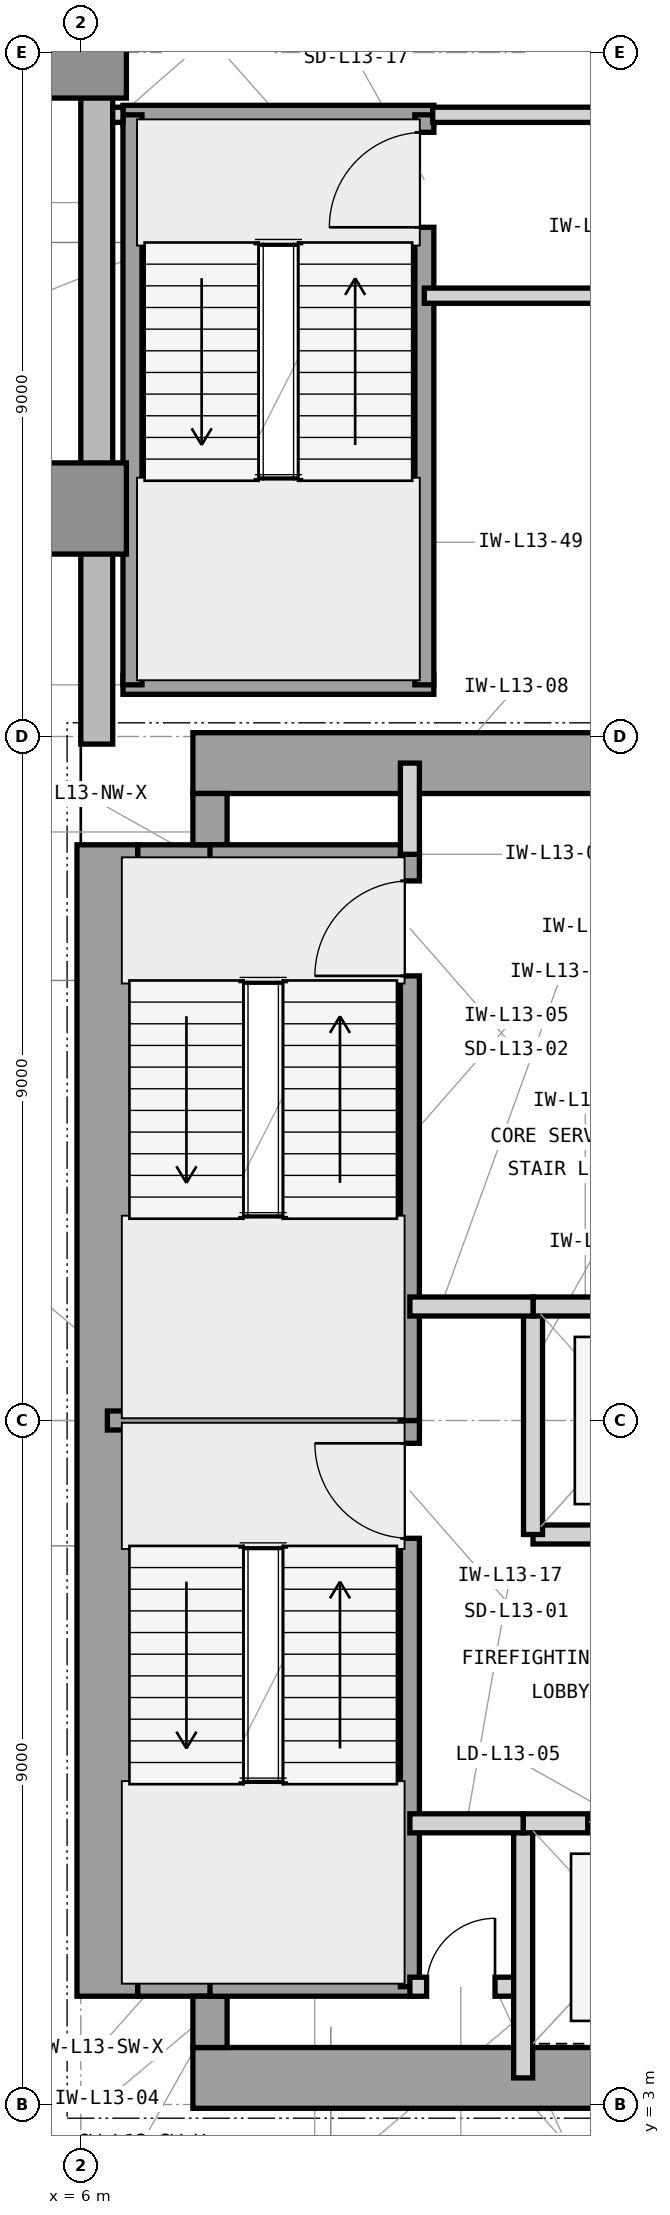
"""IFC4 building model, lengths in metres.
Left out: names, types, materials, properties, quantities, classifications, styles, units other than length and angle.
Written with IfcOpenShell. Run it as: python <this file> out.ifc"""

import sys

from ifc_helpers import new_model, si_unit, direction, frame, frame_2d, origin, origin_2d, place, context, subcontext, project, spatial, rectangle, extrude, element, fill, save


model = new_model("IFC4")
c1 = context("Model", 3, precision=1e-05, world=origin(), true_north=direction((0.0, 1.0)))
c2 = subcontext(c1, "Body", "Model", "MODEL_VIEW")
j1 = project(units=[si_unit("LENGTHUNIT", "METRE"), si_unit("PLANEANGLEUNIT", "RADIAN")], contexts=[c1])
p1 = place(None, origin())
s1 = spatial("IfcSite", under=j1, at=p1, CompositionType="ELEMENT")
p2 = place(p1, origin())
s2 = spatial("IfcBuilding", under=s1, at=p2, CompositionType="ELEMENT")
p3 = place(p2, frame((0.0, 0.0, 59.4)))
s3 = spatial("IfcBuildingStorey", under=s2, at=p3, CompositionType="ELEMENT", Elevation=59.4)
p4 = place(p3, frame((7.475, 3.35, 0.0), z_axis=(0.0, 0.0, 1.0), x_axis=(1.0, 0.0, 0.0)))
e1 = element("IfcWall", 1, at=p4, inside=s3, PredefinedType="SHEAR", context=c2, shape_type="SweptSolid", body=[
    extrude(rectangle(XDim=16.575, YDim=0.8, at=frame_2d((8.288, 0.0))), origin(), (0.0, 0.0, 1.0), 4.2),
])
p5 = place(p3, frame((6.35, 4.425, 0.0), z_axis=(0.0, 0.0, 1.0), x_axis=(0.0, 1.0, 0.0)))
e2 = element("IfcWall", 2, at=p5, inside=s3, PredefinedType="SHEAR", context=c2, shape_type="SweptSolid", body=[
    extrude(rectangle(XDim=15.15, YDim=0.8, at=frame_2d((7.575, 0.0))), origin(), (0.0, 0.0, 1.0), 4.2),
])
p6 = place(p3, frame((7.475, 20.65, 0.0), z_axis=(0.0, 0.0, 1.0), x_axis=(1.0, 0.0, 0.0)))
e3 = element("IfcWall", 3, at=p6, inside=s3, PredefinedType="SHEAR", context=c2, shape_type="SweptSolid", body=[
    extrude(rectangle(XDim=12.325, YDim=0.8, at=frame_2d((6.163, 0.0))), origin(), (0.0, 0.0, 1.0), 4.2),
])
p7 = place(p3, frame((6.75, 4.65, 0.0), z_axis=(0.0, 0.0, 1.0), x_axis=(1.0, 0.0, 0.0)))
e4 = element("IfcWall", 4, at=p7, inside=s3, PredefinedType="SHEAR", context=c2, shape_type="SweptSolid", body=[
    extrude(rectangle(XDim=1.175, YDim=0.45, at=frame_2d((0.587, 0.0))), origin(), (0.0, 0.0, 1.0), 4.2),
])
p8 = place(p3, frame((7.7, 3.75, 0.0), z_axis=(0.0, 0.0, 1.0), x_axis=(0.0, 1.0, 0.0)))
e5 = element("IfcWall", 5, at=p8, inside=s3, PredefinedType="SHEAR", context=c2, shape_type="SweptSolid", body=[
    extrude(rectangle(XDim=0.675, YDim=0.45, at=frame_2d((0.337, 0.0))), origin(), (0.0, 0.0, 1.0), 4.2),
])
p9 = place(p3, frame((6.75, 19.35, 0.0), z_axis=(0.0, 0.0, 1.0), x_axis=(1.0, 0.0, 0.0)))
e6 = element("IfcWall", 6, at=p9, inside=s3, PredefinedType="SHEAR", context=c2, shape_type="SweptSolid", body=[
    extrude(rectangle(XDim=1.175, YDim=0.45, at=frame_2d((0.587, 0.0))), origin(), (0.0, 0.0, 1.0), 4.2),
])
p10 = place(p3, frame((7.7, 19.575, 0.0), z_axis=(0.0, 0.0, 1.0), x_axis=(0.0, 1.0, 0.0)))
e7 = element("IfcWall", 7, at=p10, inside=s3, PredefinedType="SHEAR", context=c2, shape_type="SweptSolid", body=[
    extrude(rectangle(XDim=0.675, YDim=0.45, at=frame_2d((0.337, 0.0))), origin(), (0.0, 0.0, 1.0), 4.2),
])
for number, where, z_axis, x_axis in (
    (8, (6.0, 24.0, 0.0), (0.0, 0.0, 1.0), (1.0, 0.0, 0.0)),
    (9, (6.0, 30.0, 0.0), (0.0, 0.0, 1.0), (1.0, 0.0, 0.0)),
):
    element("IfcColumn", number, at=place(p3, frame(where, z_axis=z_axis, x_axis=x_axis)), inside=s3, PredefinedType="COLUMN", context=c2, shape_type="SweptSolid", body=[
        extrude(rectangle(XDim=1.2, YDim=1.2, at=origin_2d()), origin(), (0.0, 0.0, 1.0), 4.2),
    ])
p11 = place(p3, frame((6.21, 49.4, 0.0), z_axis=(0.0, 0.0, 1.0), x_axis=(0.0, -1.0, 0.0)))
e10 = element("IfcWall", 10, at=p11, inside=s3, PredefinedType="STANDARD", context=c2, shape_type="SweptSolid", body=[
    extrude(rectangle(XDim=28.5, YDim=0.42, at=frame_2d((14.25, 0.0))), origin(), (0.0, 0.0, 1.0), 3.98),
])
p12 = place(p11, frame((15.225, 0.0, 0.85)))
e11 = element("IfcOpeningElement", 11, at=p12, cuts=e10, PredefinedType="OPENING", context=c2, shape_type="SweptSolid", body=[
    extrude(rectangle(XDim=2.8, YDim=2.45, at=frame_2d((1.4, 1.225))), frame((0.0, 0.22, 0.0), z_axis=(0.0, -1.0, 0.0), x_axis=(1.0, 0.0, 0.0)), (0.0, 0.0, 1.0), 0.44),
])
p13 = place(p11, frame((8.436, 0.0, 0.85)))
e12 = element("IfcOpeningElement", 12, at=p13, cuts=e10, PredefinedType="OPENING", context=c2, shape_type="SweptSolid", body=[
    extrude(rectangle(XDim=1.2, YDim=2.45, at=frame_2d((0.6, 1.225))), frame((0.0, 0.22, 0.0), z_axis=(0.0, -1.0, 0.0), x_axis=(1.0, 0.0, 0.0)), (0.0, 0.0, 1.0), 0.44),
])
p14 = place(p3, frame((6.35, 12.0, 0.0), z_axis=(0.0, 0.0, 1.0), x_axis=(1.0, 0.0, 0.0)))
e13 = element("IfcWall", 13, at=p14, inside=s3, PredefinedType="SHEAR", context=c2, shape_type="SweptSolid", body=[
    extrude(rectangle(XDim=4.105, YDim=0.25, at=frame_2d((2.052, 0.0))), origin(), (0.0, 0.0, 1.0), 4.2),
])
for number, where, z_axis, x_axis in (
    (14, (7.7, 4.55, 0.0), (0.0, 0.0, 1.0), (1.0, 0.0, 0.0)),
    (15, (7.7, 19.45, 0.0), (0.0, 0.0, 1.0), (1.0, 0.0, 0.0)),
):
    element("IfcWall", number, at=place(p3, frame(where, z_axis=z_axis, x_axis=x_axis)), inside=s3, PredefinedType="SHEAR", context=c2, shape_type="SweptSolid", body=[
        extrude(rectangle(XDim=2.755, YDim=0.25, at=frame_2d((1.377, 0.0))), origin(), (0.0, 0.0, 1.0), 4.2),
    ])
p15 = place(p3, frame((10.33, 4.55, 0.0), z_axis=(0.0, 0.0, 1.0), x_axis=(0.0, 1.0, 0.0)))
e16 = element("IfcWall", 16, at=p15, inside=s3, PredefinedType="SHEAR", context=c2, shape_type="SweptSolid", body=[
    extrude(rectangle(XDim=7.45, YDim=0.25, at=frame_2d((3.725, 0.0))), origin(), (0.0, 0.0, 1.0), 4.2),
])
p16 = place(p15, frame((5.9, 0.0, 0.0)))
e17 = element("IfcOpeningElement", 17, at=p16, cuts=e16, PredefinedType="OPENING", context=c2, shape_type="SweptSolid", body=[
    extrude(rectangle(XDim=1.25, YDim=2.2, at=frame_2d((0.625, 1.1))), frame((0.0, 0.135, 0.0), z_axis=(0.0, -1.0, 0.0), x_axis=(1.0, 0.0, 0.0)), (0.0, 0.0, 1.0), 0.27),
])
p17 = place(p3, frame((10.33, 12.0, 0.0), z_axis=(0.0, 0.0, 1.0), x_axis=(0.0, 1.0, 0.0)))
e18 = element("IfcWall", 18, at=p17, inside=s3, PredefinedType="SHEAR", context=c2, shape_type="SweptSolid", body=[
    extrude(rectangle(XDim=7.45, YDim=0.25, at=frame_2d((3.725, 0.0))), origin(), (0.0, 0.0, 1.0), 4.2),
])
p18 = place(p17, frame((5.85, 0.0, 0.0)))
e19 = element("IfcOpeningElement", 19, at=p18, cuts=e18, PredefinedType="OPENING", context=c2, shape_type="SweptSolid", body=[
    extrude(rectangle(XDim=1.25, YDim=2.2, at=frame_2d((0.625, 1.1))), frame((0.0, 0.135, 0.0), z_axis=(0.0, -1.0, 0.0), x_axis=(1.0, 0.0, 0.0)), (0.0, 0.0, 1.0), 0.27),
])
p19 = place(p3, frame((10.33, 4.55, 0.0), z_axis=(0.0, 0.0, 1.0), x_axis=(1.0, 0.0, 0.0)))
e20 = element("IfcWall", 20, at=p19, inside=s3, PredefinedType="PARTITIONING", context=c2, shape_type="SweptSolid", body=[
    extrude(rectangle(XDim=1.49, YDim=0.25, at=frame_2d((0.745, 0.0))), origin(), (0.0, 0.0, 1.0), 3.97),
])
p20 = place(p19, frame((0.22, 0.0, 0.0)))
e21 = element("IfcOpeningElement", 21, at=p20, cuts=e20, PredefinedType="OPENING", context=c2, shape_type="SweptSolid", body=[
    extrude(rectangle(XDim=0.9, YDim=2.1, at=frame_2d((0.45, 1.05))), frame((0.0, 0.135, 0.0), z_axis=(0.0, -1.0, 0.0), x_axis=(1.0, 0.0, 0.0)), (0.0, 0.0, 1.0), 0.27),
])
p21 = place(p3, frame((11.82, 3.35, 0.0), z_axis=(0.0, 0.0, 1.0), x_axis=(0.0, 1.0, 0.0)))
e22 = element("IfcWall", 22, at=p21, inside=s3, PredefinedType="PARTITIONING", context=c2, shape_type="SweptSolid", body=[
    extrude(rectangle(XDim=3.35, YDim=0.25, at=frame_2d((1.675, 0.0))), origin(), (0.0, 0.0, 1.0), 3.97),
])
p22 = place(p3, frame((10.33, 19.45, 0.0), z_axis=(0.0, 0.0, 1.0), x_axis=(0.0, 1.0, 0.0)))
e23 = element("IfcWall", 23, at=p22, inside=s3, PredefinedType="PARTITIONING", context=c2, shape_type="SweptSolid", body=[
    extrude(rectangle(XDim=1.2, YDim=0.25, at=frame_2d((0.6, 0.0))), origin(), (0.0, 0.0, 1.0), 3.114),
])
p23 = place(p3, frame((11.82, 6.7, 0.0), z_axis=(0.0, 0.0, 1.0), x_axis=(1.0, 0.0, 0.0)))
e24 = element("IfcWall", 24, at=p23, inside=s3, PredefinedType="PARTITIONING", context=c2, shape_type="SweptSolid", body=[
    extrude(rectangle(XDim=2.88, YDim=0.25, at=frame_2d((1.44, 0.0))), origin(), (0.0, 0.0, 1.0), 3.426),
])
p24 = place(p23, frame((0.85, 0.0, 0.0)))
e25 = element("IfcOpeningElement", 25, at=p24, cuts=e24, PredefinedType="OPENING", context=c2, shape_type="SweptSolid", body=[
    extrude(rectangle(XDim=1.1, YDim=2.25, at=frame_2d((0.55, 1.125))), frame((0.0, 0.135, 0.0), z_axis=(0.0, -1.0, 0.0), x_axis=(1.0, 0.0, 0.0)), (0.0, 0.0, 1.0), 0.27),
])
p25 = place(p3, frame((11.95, 10.5, 0.0), z_axis=(0.0, 0.0, 1.0), x_axis=(1.0, 0.0, 0.0)))
e26 = element("IfcWall", 26, at=p25, inside=s3, PredefinedType="PARTITIONING", context=c2, shape_type="SweptSolid", body=[
    extrude(rectangle(XDim=2.75, YDim=0.25, at=frame_2d((1.375, 0.0))), origin(), (0.0, 0.0, 1.0), 3.426),
])
p26 = place(p25, frame((0.8, 0.0, 0.0)))
e27 = element("IfcOpeningElement", 27, at=p26, cuts=e26, PredefinedType="OPENING", context=c2, shape_type="SweptSolid", body=[
    extrude(rectangle(XDim=1.1, YDim=2.25, at=frame_2d((0.55, 1.125))), frame((0.0, 0.135, 0.0), z_axis=(0.0, -1.0, 0.0), x_axis=(1.0, 0.0, 0.0)), (0.0, 0.0, 1.0), 0.27),
])
p27 = place(p3, frame((11.95, 10.5, 0.0), z_axis=(0.0, 0.0, 1.0), x_axis=(0.0, 1.0, 0.0)))
e28 = element("IfcWall", 28, at=p27, inside=s3, PredefinedType="PARTITIONING", context=c2, shape_type="SweptSolid", body=[
    extrude(rectangle(XDim=3.0, YDim=0.25, at=frame_2d((1.5, 0.0))), origin(), (0.0, 0.0, 1.0), 3.97),
])
p28 = place(p3, frame((11.95, 13.5, 0.0), z_axis=(0.0, 0.0, 1.0), x_axis=(1.0, 0.0, 0.0)))
e29 = element("IfcWall", 29, at=p28, inside=s3, PredefinedType="PARTITIONING", context=c2, shape_type="SweptSolid", body=[
    extrude(rectangle(XDim=2.75, YDim=0.25, at=frame_2d((1.375, 0.0))), origin(), (0.0, 0.0, 1.0), 3.426),
])
p29 = place(p3, frame((10.33, 13.5, 0.0), z_axis=(0.0, 0.0, 1.0), x_axis=(1.0, 0.0, 0.0)))
e30 = element("IfcWall", 30, at=p29, inside=s3, PredefinedType="PARTITIONING", context=c2, shape_type="SweptSolid", body=[
    extrude(rectangle(XDim=1.62, YDim=0.25, at=frame_2d((0.81, 0.0))), origin(), (0.0, 0.0, 1.0), 3.426),
])
p30 = place(p3, frame((10.33, 6.7, 0.0), z_axis=(0.0, 0.0, 1.0), x_axis=(1.0, 0.0, 0.0)))
e31 = element("IfcWall", 31, at=p30, inside=s3, PredefinedType="PARTITIONING", context=c2, shape_type="SweptSolid", body=[
    extrude(rectangle(XDim=1.49, YDim=0.25, at=frame_2d((0.745, 0.0))), origin(), (0.0, 0.0, 1.0), 3.426),
])
for number, where, z_axis, x_axis in (
    (32, (6.555, 21.68, 0.0), (0.0, 0.0, 1.0), (1.0, 0.0, 0.0)),
    (33, (6.555, 29.18, 0.0), (0.0, 0.0, 1.0), (1.0, 0.0, 0.0)),
):
    element("IfcWall", number, at=place(p3, frame(where, z_axis=z_axis, x_axis=x_axis)), inside=s3, PredefinedType="SHEAR", context=c2, shape_type="SweptSolid", body=[
        extrude(rectangle(XDim=4.09, YDim=0.25, at=frame_2d((2.045, 0.0))), origin(), (0.0, 0.0, 1.0), 4.2),
    ])
p31 = place(p3, frame((6.68, 21.68, 0.0), z_axis=(0.0, 0.0, 1.0), x_axis=(0.0, 1.0, 0.0)))
e34 = element("IfcWall", 34, at=p31, inside=s3, PredefinedType="SHEAR", context=c2, shape_type="SweptSolid", body=[
    extrude(rectangle(XDim=7.5, YDim=0.25, at=frame_2d((3.75, 0.0))), origin(), (0.0, 0.0, 1.0), 4.2),
])
p32 = place(p3, frame((10.52, 21.68, 0.0), z_axis=(0.0, 0.0, 1.0), x_axis=(0.0, 1.0, 0.0)))
e35 = element("IfcWall", 35, at=p32, inside=s3, PredefinedType="SHEAR", context=c2, shape_type="SweptSolid", body=[
    extrude(rectangle(XDim=7.5, YDim=0.25, at=frame_2d((3.75, 0.0))), origin(), (0.0, 0.0, 1.0), 4.2),
])
p33 = place(p32, frame((6.02, 0.0, 0.0)))
e36 = element("IfcOpeningElement", 36, at=p33, cuts=e35, PredefinedType="OPENING", context=c2, shape_type="SweptSolid", body=[
    extrude(rectangle(XDim=1.25, YDim=2.2, at=frame_2d((0.625, 1.1))), frame((0.0, 0.135, 0.0), z_axis=(0.0, -1.0, 0.0), x_axis=(1.0, 0.0, 0.0)), (0.0, 0.0, 1.0), 0.27),
])
p34 = place(p3, frame((10.52, 26.8, 0.0), z_axis=(0.0, 0.0, 1.0), x_axis=(1.0, 0.0, 0.0)))
e37 = element("IfcWall", 37, at=p34, inside=s3, PredefinedType="PARTITIONING", context=c2, shape_type="SweptSolid", body=[
    extrude(rectangle(XDim=9.28, YDim=0.2, at=frame_2d((4.64, 0.0))), origin(), (0.0, 0.0, 1.0), 3.97),
])
p35 = place(p34, frame((4.0, 0.0, 0.0)))
e38 = element("IfcOpeningElement", 38, at=p35, cuts=e37, PredefinedType="OPENING", context=c2, shape_type="SweptSolid", body=[
    extrude(rectangle(XDim=1.0, YDim=2.15, at=frame_2d((0.5, 1.075))), frame((0.0, 0.11, 0.0), z_axis=(0.0, -1.0, 0.0), x_axis=(1.0, 0.0, 0.0)), (0.0, 0.0, 1.0), 0.22),
])
p36 = place(p3, frame((6.42, 29.18, 0.0), z_axis=(0.0, 0.0, 1.0), x_axis=(1.0, 0.0, 0.0)))
e39 = element("IfcWall", 39, at=p36, inside=s3, PredefinedType="PARTITIONING", context=c2, shape_type="SweptSolid", body=[
    extrude(rectangle(XDim=0.135, YDim=0.2, at=frame_2d((0.067, 0.0))), origin(), (0.0, 0.0, 1.0), 3.97),
])
p37 = place(p3, frame((10.63, 29.18, 0.0), z_axis=(0.0, 0.0, 1.0), x_axis=(1.0, 0.0, 0.0)))
e40 = element("IfcWall", 40, at=p37, inside=s3, PredefinedType="PARTITIONING", context=c2, shape_type="SweptSolid", body=[
    extrude(rectangle(XDim=7.77, YDim=0.2, at=frame_2d((3.885, 0.0))), origin(), (0.0, 0.0, 1.0), 3.97),
])
p38 = place(p16, origin())
e41 = element("IfcDoor", 41, at=p38, inside=s3, OperationType="SINGLE_SWING_RIGHT", PredefinedType="DOOR", context=c2, shape_type="SweptSolid", body=[
    extrude(rectangle(XDim=1.25, YDim=2.2, at=frame_2d((0.625, 1.1))), frame((0.0, 0.025, 0.0), z_axis=(0.0, -1.0, 0.0), x_axis=(1.0, 0.0, 0.0)), (0.0, 0.0, 1.0), 0.05),
])
fill(e17, e41)
p39 = place(p18, origin())
e42 = element("IfcDoor", 42, at=p39, inside=s3, OperationType="SINGLE_SWING_LEFT", PredefinedType="DOOR", context=c2, shape_type="SweptSolid", body=[
    extrude(rectangle(XDim=1.25, YDim=2.2, at=frame_2d((0.625, 1.1))), frame((0.0, 0.025, 0.0), z_axis=(0.0, -1.0, 0.0), x_axis=(1.0, 0.0, 0.0)), (0.0, 0.0, 1.0), 0.05),
])
fill(e19, e42)
p40 = place(p20, origin())
e43 = element("IfcDoor", 43, at=p40, inside=s3, OperationType="SINGLE_SWING_RIGHT", PredefinedType="TRAPDOOR", context=c2, shape_type="SweptSolid", body=[
    extrude(rectangle(XDim=0.9, YDim=2.1, at=frame_2d((0.45, 1.05))), frame((0.0, 0.025, 0.0), z_axis=(0.0, -1.0, 0.0), x_axis=(1.0, 0.0, 0.0)), (0.0, 0.0, 1.0), 0.05),
])
fill(e21, e43)
p41 = place(p24, origin())
e44 = element("IfcDoor", 44, at=p41, inside=s3, OperationType="DOUBLE_DOOR_SLIDING", PredefinedType="DOOR", context=c2, shape_type="SweptSolid", body=[
    extrude(rectangle(XDim=1.1, YDim=2.25, at=frame_2d((0.55, 1.125))), frame((0.0, 0.025, 0.0), z_axis=(0.0, -1.0, 0.0), x_axis=(1.0, 0.0, 0.0)), (0.0, 0.0, 1.0), 0.05),
])
fill(e25, e44)
p42 = place(p33, origin())
e45 = element("IfcDoor", 45, at=p42, inside=s3, OperationType="SINGLE_SWING_LEFT", PredefinedType="DOOR", context=c2, shape_type="SweptSolid", body=[
    extrude(rectangle(XDim=1.25, YDim=2.2, at=frame_2d((0.625, 1.1))), frame((0.0, 0.025, 0.0), z_axis=(0.0, -1.0, 0.0), x_axis=(1.0, 0.0, 0.0)), (0.0, 0.0, 1.0), 0.05),
])
fill(e36, e45)
save(model, sys.argv[1])
